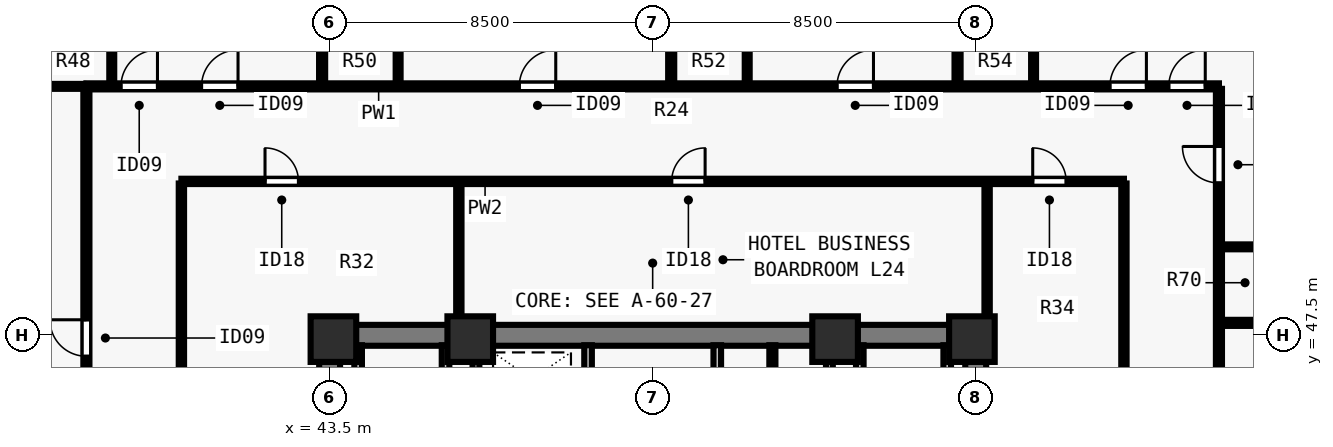
"""IFC4 building model, lengths in metres.
Left out: names, types, materials, properties, quantities, classifications, styles, units other than length and angle.
Written with IfcOpenShell. Run it as: python <this file> out.ifc"""

import sys

from ifc_helpers import new_model, si_unit, direction, frame, frame_2d, origin, origin_2d, place, context, subcontext, project, spatial, rectangle, extrude, element, fill, save


model = new_model("IFC4")
c1 = context("Model", 3, precision=1e-05, world=origin(), true_north=direction((0.0, 1.0)))
c2 = subcontext(c1, "Body", "Model", "MODEL_VIEW")
j1 = project(units=[si_unit("LENGTHUNIT", "METRE"), si_unit("PLANEANGLEUNIT", "RADIAN")], contexts=[c1])
p1 = place(None, origin())
s1 = spatial("IfcSite", under=j1, at=p1, CompositionType="ELEMENT")
p2 = place(p1, origin())
s2 = spatial("IfcBuilding", under=s1, at=p2, CompositionType="ELEMENT")
p3 = place(p2, frame((0.0, 0.0, 90.0)))
s3 = spatial("IfcBuildingStorey", under=s2, at=p3, CompositionType="ELEMENT", Elevation=90.0)
for number, where, z_axis, x_axis in (
    (1, (43.6, 47.4, 0.0), (0.0, 0.0, 1.0), (1.0, 0.0, 0.0)),
    (2, (47.2, 47.4, 0.0), (0.0, 0.0, 1.0), (1.0, 0.0, 0.0)),
    (3, (56.8, 47.4, 0.0), (0.0, 0.0, 1.0), (1.0, 0.0, 0.0)),
    (4, (60.4, 47.4, 0.0), (0.0, 0.0, 1.0), (1.0, 0.0, 0.0)),
):
    element("IfcColumn", number, at=place(p3, frame(where, z_axis=z_axis, x_axis=x_axis)), inside=s3, PredefinedType="COLUMN", context=c2, shape_type="SweptSolid", body=[
        extrude(rectangle(XDim=1.2, YDim=1.2, at=origin_2d()), origin(), (0.0, 0.0, 1.0), 3.5),
    ])
p4 = place(p3, frame((43.225, 47.5, 0.0), z_axis=(0.0, 0.0, 1.0), x_axis=(1.0, 0.0, 0.0)))
e5 = element("IfcWall", 5, at=p4, inside=s3, PredefinedType="SHEAR", context=c2, shape_type="SweptSolid", body=[
    extrude(rectangle(XDim=17.55, YDim=0.55, at=frame_2d((8.775, 0.0))), origin(), (0.0, 0.0, 1.0), 3.28),
])
for number, where, z_axis, x_axis in (
    (6, (43.5, 40.8, 0.0), (0.0, 0.0, 1.0), (0.0, 1.0, 0.0)),
    (7, (60.5, 40.8, 0.0), (0.0, 0.0, 1.0), (0.0, 1.0, 0.0)),
):
    element("IfcWall", number, at=place(p3, frame(where, z_axis=z_axis, x_axis=x_axis)), inside=s3, PredefinedType="SHEAR", context=c2, shape_type="SweptSolid", body=[
        extrude(rectangle(XDim=6.435, YDim=0.55, at=frame_2d((3.218, 0.0))), origin(), (0.0, 0.0, 1.0), 3.28),
    ])
p5 = place(p3, frame((50.3, 40.585, 0.0), z_axis=(0.0, 0.0, 1.0), x_axis=(0.0, 1.0, 0.0)))
e8 = element("IfcWall", 8, at=p5, inside=s3, PredefinedType="SOLIDWALL", context=c2, shape_type="SweptSolid", body=[
    extrude(rectangle(XDim=6.655, YDim=0.2, at=frame_2d((3.328, 0.0))), origin(), (0.0, 0.0, 1.0), 3.28),
])
p6 = place(p5, frame((5.065, 0.0, 0.0)))
e9 = element("IfcOpeningElement", 9, at=p6, cuts=e8, PredefinedType="OPENING", context=c2, shape_type="SweptSolid", body=[
    extrude(rectangle(XDim=0.8, YDim=2.08, at=frame_2d((0.4, 1.04))), frame((0.0, 0.11, 0.0), z_axis=(0.0, -1.0, 0.0), x_axis=(1.0, 0.0, 0.0)), (0.0, 0.0, 1.0), 0.22),
])
p7 = place(p3, frame((53.7, 40.585, 0.0), z_axis=(0.0, 0.0, 1.0), x_axis=(0.0, 1.0, 0.0)))
e10 = element("IfcWall", 10, at=p7, inside=s3, PredefinedType="SOLIDWALL", context=c2, shape_type="SweptSolid", body=[
    extrude(rectangle(XDim=6.655, YDim=0.2, at=frame_2d((3.328, 0.0))), origin(), (0.0, 0.0, 1.0), 3.28),
])
p8 = place(p7, frame((0.195, 0.0, 0.0)))
e11 = element("IfcOpeningElement", 11, at=p8, cuts=e10, PredefinedType="OPENING", context=c2, shape_type="SweptSolid", body=[
    extrude(rectangle(XDim=0.8, YDim=2.08, at=frame_2d((0.4, 1.04))), frame((0.0, 0.11, 0.0), z_axis=(0.0, -1.0, 0.0), x_axis=(1.0, 0.0, 0.0)), (0.0, 0.0, 1.0), 0.22),
])
p9 = place(p7, frame((4.265, 0.0, 0.0)))
e12 = element("IfcOpeningElement", 12, at=p9, cuts=e10, PredefinedType="OPENING", context=c2, shape_type="SweptSolid", body=[
    extrude(rectangle(XDim=0.95, YDim=2.12, at=frame_2d((0.475, 1.06))), frame((0.0, 0.11, 0.0), z_axis=(0.0, -1.0, 0.0), x_axis=(1.0, 0.0, 0.0)), (0.0, 0.0, 1.0), 0.22),
])
for number, where, z_axis, x_axis in (
    (13, (46.55, 43.735, 0.0), (0.0, 0.0, 1.0), (0.0, 1.0, 0.0)),
    (14, (44.25, 43.735, 0.0), (0.0, 0.0, 1.0), (0.0, 1.0, 0.0)),
    (15, (57.45, 43.735, 0.0), (0.0, 0.0, 1.0), (0.0, 1.0, 0.0)),
    (16, (59.75, 43.735, 0.0), (0.0, 0.0, 1.0), (0.0, 1.0, 0.0)),
):
    element("IfcWall", number, at=place(p3, frame(where, z_axis=z_axis, x_axis=x_axis)), inside=s3, PredefinedType="SOLIDWALL", context=c2, shape_type="SweptSolid", body=[
        extrude(rectangle(XDim=3.505, YDim=0.2, at=frame_2d((1.752, 0.0))), origin(), (0.0, 0.0, 1.0), 3.28),
    ])
for number, where, z_axis, x_axis in (
    (17, (47.35, 43.735, 0.0), (0.0, 0.0, 1.0), (0.0, 1.0, 0.0)),
    (18, (56.65, 43.735, 0.0), (0.0, 0.0, 1.0), (0.0, 1.0, 0.0)),
):
    element("IfcWall", number, at=place(p3, frame(where, z_axis=z_axis, x_axis=x_axis)), inside=s3, PredefinedType="SOLIDWALL", context=c2, shape_type="SweptSolid", body=[
        extrude(rectangle(XDim=3.505, YDim=0.18, at=frame_2d((1.752, 0.0))), origin(), (0.0, 0.0, 1.0), 3.28),
    ])
p10 = place(p3, frame((55.15, 44.195, 0.0), z_axis=(0.0, 0.0, 1.0), x_axis=(0.0, 1.0, 0.0)))
e19 = element("IfcWall", 19, at=p10, inside=s3, PredefinedType="PARTITIONING", context=c2, shape_type="SweptSolid", body=[
    extrude(rectangle(XDim=3.045, YDim=0.16, at=frame_2d((1.522, 0.0))), origin(), (0.0, 0.0, 1.0), 3.28),
])
p11 = place(p10, frame((1.025, 0.0, 0.0)))
e20 = element("IfcOpeningElement", 20, at=p11, cuts=e19, PredefinedType="OPENING", context=c2, shape_type="SweptSolid", body=[
    extrude(rectangle(XDim=0.8, YDim=2.1, at=frame_2d((0.4, 1.05))), frame((0.0, 0.09, 0.0), z_axis=(0.0, -1.0, 0.0), x_axis=(1.0, 0.0, 0.0)), (0.0, 0.0, 1.0), 0.18),
])
p12 = place(p3, frame((37.1, 54.05, 0.0), z_axis=(0.0, 0.0, 1.0), x_axis=(1.0, 0.0, 0.0)))
e21 = element("IfcWall", 21, at=p12, inside=s3, PredefinedType="PARTITIONING", context=c2, shape_type="SweptSolid", body=[
    extrude(rectangle(XDim=29.8, YDim=0.16, at=frame_2d((14.9, 0.0))), origin(), (0.0, 0.0, 1.0), 3.28),
])
p13 = place(p12, frame((0.91, 0.0, 0.0)))
e22 = element("IfcOpeningElement", 22, at=p13, cuts=e21, PredefinedType="OPENING", context=c2, shape_type="SweptSolid", body=[
    extrude(rectangle(XDim=0.96, YDim=2.15, at=frame_2d((0.48, 1.075))), frame((0.0, 0.09, 0.0), z_axis=(0.0, -1.0, 0.0), x_axis=(1.0, 0.0, 0.0)), (0.0, 0.0, 1.0), 0.18),
])
p14 = place(p12, frame((3.03, 0.0, 0.0)))
e23 = element("IfcOpeningElement", 23, at=p14, cuts=e21, PredefinedType="OPENING", context=c2, shape_type="SweptSolid", body=[
    extrude(rectangle(XDim=0.96, YDim=2.15, at=frame_2d((0.48, 1.075))), frame((0.0, 0.09, 0.0), z_axis=(0.0, -1.0, 0.0), x_axis=(1.0, 0.0, 0.0)), (0.0, 0.0, 1.0), 0.18),
])
p15 = place(p12, frame((11.39, 0.0, 0.0)))
e24 = element("IfcOpeningElement", 24, at=p15, cuts=e21, PredefinedType="OPENING", context=c2, shape_type="SweptSolid", body=[
    extrude(rectangle(XDim=0.96, YDim=2.15, at=frame_2d((0.48, 1.075))), frame((0.0, 0.09, 0.0), z_axis=(0.0, -1.0, 0.0), x_axis=(1.0, 0.0, 0.0)), (0.0, 0.0, 1.0), 0.18),
])
p16 = place(p12, frame((19.75, 0.0, 0.0)))
e25 = element("IfcOpeningElement", 25, at=p16, cuts=e21, PredefinedType="OPENING", context=c2, shape_type="SweptSolid", body=[
    extrude(rectangle(XDim=0.96, YDim=2.15, at=frame_2d((0.48, 1.075))), frame((0.0, 0.09, 0.0), z_axis=(0.0, -1.0, 0.0), x_axis=(1.0, 0.0, 0.0)), (0.0, 0.0, 1.0), 0.18),
])
p17 = place(p12, frame((26.931, 0.0, 0.0)))
e26 = element("IfcOpeningElement", 26, at=p17, cuts=e21, PredefinedType="OPENING", context=c2, shape_type="SweptSolid", body=[
    extrude(rectangle(XDim=0.96, YDim=2.15, at=frame_2d((0.48, 1.075))), frame((0.0, 0.09, 0.0), z_axis=(0.0, -1.0, 0.0), x_axis=(1.0, 0.0, 0.0)), (0.0, 0.0, 1.0), 0.18),
])
p18 = place(p12, frame((28.48, 0.0, 0.0)))
e27 = element("IfcOpeningElement", 27, at=p18, cuts=e21, PredefinedType="OPENING", context=c2, shape_type="SweptSolid", body=[
    extrude(rectangle(XDim=0.96, YDim=2.15, at=frame_2d((0.48, 1.075))), frame((0.0, 0.09, 0.0), z_axis=(0.0, -1.0, 0.0), x_axis=(1.0, 0.0, 0.0)), (0.0, 0.0, 1.0), 0.18),
])
p19 = place(p3, frame((37.1, 24.015, 0.0), z_axis=(0.0, 0.0, 1.0), x_axis=(0.0, 1.0, 0.0)))
e28 = element("IfcWall", 28, at=p19, inside=s3, PredefinedType="PARTITIONING", context=c2, shape_type="SweptSolid", body=[
    extrude(rectangle(XDim=29.97, YDim=0.16, at=frame_2d((14.985, 0.0))), origin(), (0.0, 0.0, 1.0), 3.28),
])
p20 = place(p19, frame((8.134, 0.0, 0.0)))
e29 = element("IfcOpeningElement", 29, at=p20, cuts=e28, PredefinedType="OPENING", context=c2, shape_type="SweptSolid", body=[
    extrude(rectangle(XDim=0.96, YDim=2.15, at=frame_2d((0.48, 1.075))), frame((0.0, 0.09, 0.0), z_axis=(0.0, -1.0, 0.0), x_axis=(1.0, 0.0, 0.0)), (0.0, 0.0, 1.0), 0.18),
])
p21 = place(p19, frame((22.934, 0.0, 0.0)))
e30 = element("IfcOpeningElement", 30, at=p21, cuts=e28, PredefinedType="OPENING", context=c2, shape_type="SweptSolid", body=[
    extrude(rectangle(XDim=0.96, YDim=2.15, at=frame_2d((0.48, 1.075))), frame((0.0, 0.09, 0.0), z_axis=(0.0, -1.0, 0.0), x_axis=(1.0, 0.0, 0.0)), (0.0, 0.0, 1.0), 0.18),
])
p22 = place(p3, frame((66.9, 24.015, 0.0), z_axis=(0.0, 0.0, 1.0), x_axis=(0.0, 1.0, 0.0)))
e31 = element("IfcWall", 31, at=p22, inside=s3, PredefinedType="PARTITIONING", context=c2, shape_type="SweptSolid", body=[
    extrude(rectangle(XDim=29.97, YDim=0.16, at=frame_2d((14.985, 0.0))), origin(), (0.0, 0.0, 1.0), 3.28),
])
p23 = place(p22, frame((3.911, 0.0, 0.0)))
e32 = element("IfcOpeningElement", 32, at=p23, cuts=e31, PredefinedType="OPENING", context=c2, shape_type="SweptSolid", body=[
    extrude(rectangle(XDim=0.96, YDim=2.15, at=frame_2d((0.48, 1.075))), frame((0.0, 0.09, 0.0), z_axis=(0.0, -1.0, 0.0), x_axis=(1.0, 0.0, 0.0)), (0.0, 0.0, 1.0), 0.18),
])
p24 = place(p22, frame((9.544, 0.0, 0.0)))
e33 = element("IfcOpeningElement", 33, at=p24, cuts=e31, PredefinedType="OPENING", context=c2, shape_type="SweptSolid", body=[
    extrude(rectangle(XDim=0.96, YDim=2.15, at=frame_2d((0.48, 1.075))), frame((0.0, 0.09, 0.0), z_axis=(0.0, -1.0, 0.0), x_axis=(1.0, 0.0, 0.0)), (0.0, 0.0, 1.0), 0.18),
])
p25 = place(p22, frame((15.625, 0.0, 0.0)))
e34 = element("IfcOpeningElement", 34, at=p25, cuts=e31, PredefinedType="OPENING", context=c2, shape_type="SweptSolid", body=[
    extrude(rectangle(XDim=0.96, YDim=2.15, at=frame_2d((0.48, 1.075))), frame((0.0, 0.09, 0.0), z_axis=(0.0, -1.0, 0.0), x_axis=(1.0, 0.0, 0.0)), (0.0, 0.0, 1.0), 0.18),
])
p26 = place(p22, frame((21.584, 0.0, 0.0)))
e35 = element("IfcOpeningElement", 35, at=p26, cuts=e31, PredefinedType="OPENING", context=c2, shape_type="SweptSolid", body=[
    extrude(rectangle(XDim=0.96, YDim=2.15, at=frame_2d((0.48, 1.075))), frame((0.0, 0.09, 0.0), z_axis=(0.0, -1.0, 0.0), x_axis=(1.0, 0.0, 0.0)), (0.0, 0.0, 1.0), 0.18),
])
p27 = place(p22, frame((27.494, 0.0, 0.0)))
e36 = element("IfcOpeningElement", 36, at=p27, cuts=e31, PredefinedType="OPENING", context=c2, shape_type="SweptSolid", body=[
    extrude(rectangle(XDim=0.96, YDim=2.15, at=frame_2d((0.48, 1.075))), frame((0.0, 0.09, 0.0), z_axis=(0.0, -1.0, 0.0), x_axis=(1.0, 0.0, 0.0)), (0.0, 0.0, 1.0), 0.18),
])
p28 = place(p3, frame((39.6, 51.55, 0.0), z_axis=(0.0, 0.0, 1.0), x_axis=(1.0, 0.0, 0.0)))
e37 = element("IfcWall", 37, at=p28, inside=s3, PredefinedType="PARTITIONING", context=c2, shape_type="SweptSolid", body=[
    extrude(rectangle(XDim=24.8, YDim=0.14, at=frame_2d((12.4, 0.0))), origin(), (0.0, 0.0, 1.0), 3.28),
])
p29 = place(p28, frame((2.2, 0.0, 0.0)))
e38 = element("IfcOpeningElement", 38, at=p29, cuts=e37, PredefinedType="OPENING", context=c2, shape_type="SweptSolid", body=[
    extrude(rectangle(XDim=0.88, YDim=2.1, at=frame_2d((0.44, 1.05))), frame((0.0, 0.08, 0.0), z_axis=(0.0, -1.0, 0.0), x_axis=(1.0, 0.0, 0.0)), (0.0, 0.0, 1.0), 0.16),
])
p30 = place(p28, frame((12.9, 0.0, 0.0)))
e39 = element("IfcOpeningElement", 39, at=p30, cuts=e37, PredefinedType="OPENING", context=c2, shape_type="SweptSolid", body=[
    extrude(rectangle(XDim=0.88, YDim=2.1, at=frame_2d((0.44, 1.05))), frame((0.0, 0.08, 0.0), z_axis=(0.0, -1.0, 0.0), x_axis=(1.0, 0.0, 0.0)), (0.0, 0.0, 1.0), 0.16),
])
p31 = place(p28, frame((22.4, 0.0, 0.0)))
e40 = element("IfcOpeningElement", 40, at=p31, cuts=e37, PredefinedType="OPENING", context=c2, shape_type="SweptSolid", body=[
    extrude(rectangle(XDim=0.88, YDim=2.1, at=frame_2d((0.44, 1.05))), frame((0.0, 0.08, 0.0), z_axis=(0.0, -1.0, 0.0), x_axis=(1.0, 0.0, 0.0)), (0.0, 0.0, 1.0), 0.16),
])
p32 = place(p3, frame((39.6, 40.8, 0.0), z_axis=(0.0, 0.0, 1.0), x_axis=(0.0, 1.0, 0.0)))
e41 = element("IfcWall", 41, at=p32, inside=s3, PredefinedType="PARTITIONING", context=c2, shape_type="SweptSolid", body=[
    extrude(rectangle(XDim=10.695, YDim=0.14, at=frame_2d((5.348, 0.0))), origin(), (0.0, 0.0, 1.0), 3.28),
])
p33 = place(p32, frame((2.5, 0.0, 0.0)))
e42 = element("IfcOpeningElement", 42, at=p33, cuts=e41, PredefinedType="OPENING", context=c2, shape_type="SweptSolid", body=[
    extrude(rectangle(XDim=0.88, YDim=2.1, at=frame_2d((0.44, 1.05))), frame((0.0, 0.08, 0.0), z_axis=(0.0, -1.0, 0.0), x_axis=(1.0, 0.0, 0.0)), (0.0, 0.0, 1.0), 0.16),
])
p34 = place(p3, frame((64.4, 40.8, 0.0), z_axis=(0.0, 0.0, 1.0), x_axis=(0.0, 1.0, 0.0)))
e43 = element("IfcWall", 43, at=p34, inside=s3, PredefinedType="PARTITIONING", context=c2, shape_type="SweptSolid", body=[
    extrude(rectangle(XDim=10.695, YDim=0.14, at=frame_2d((5.348, 0.0))), origin(), (0.0, 0.0, 1.0), 3.28),
])
p35 = place(p34, frame((2.5, 0.0, 0.0)))
e44 = element("IfcOpeningElement", 44, at=p35, cuts=e43, PredefinedType="OPENING", context=c2, shape_type="SweptSolid", body=[
    extrude(rectangle(XDim=0.88, YDim=2.1, at=frame_2d((0.44, 1.05))), frame((0.0, 0.08, 0.0), z_axis=(0.0, -1.0, 0.0), x_axis=(1.0, 0.0, 0.0)), (0.0, 0.0, 1.0), 0.16),
])
p36 = place(p3, frame((46.9, 47.76, 0.0), z_axis=(0.0, 0.0, 1.0), x_axis=(0.0, 1.0, 0.0)))
e45 = element("IfcWall", 45, at=p36, inside=s3, PredefinedType="PARTITIONING", context=c2, shape_type="SweptSolid", body=[
    extrude(rectangle(XDim=3.735, YDim=0.14, at=frame_2d((1.868, 0.0))), origin(), (0.0, 0.0, 1.0), 3.28),
])
p37 = place(p3, frame((60.8, 47.76, 0.0), z_axis=(0.0, 0.0, 1.0), x_axis=(0.0, 1.0, 0.0)))
e46 = element("IfcWall", 46, at=p37, inside=s3, PredefinedType="PARTITIONING", context=c2, shape_type="SweptSolid", body=[
    extrude(rectangle(XDim=3.735, YDim=0.14, at=frame_2d((1.868, 0.0))), origin(), (0.0, 0.0, 1.0), 2.439),
])
p38 = place(p3, frame((37.768, 54.115, 0.0), z_axis=(0.0, 0.0, 1.0), x_axis=(0.0, 1.0, 0.0)))
e47 = element("IfcWall", 47, at=p38, inside=s3, PredefinedType="PLUMBINGWALL", context=c2, shape_type="SweptSolid", body=[
    extrude(rectangle(XDim=2.235, YDim=0.13, at=frame_2d((1.118, 0.0))), origin(), (0.0, 0.0, 1.0), 2.439),
])
p39 = place(p3, frame((35.833, 54.05, 0.0), z_axis=(0.0, 0.0, 1.0), x_axis=(1.0, 0.0, 0.0)))
e48 = element("IfcWall", 48, at=p39, inside=s3, PredefinedType="PLUMBINGWALL", context=c2, shape_type="SweptSolid", body=[
    extrude(rectangle(XDim=1.188, YDim=0.13, at=frame_2d((0.594, 0.0))), origin(), (0.0, 0.0, 1.0), 3.28),
])
p40 = place(p3, frame((43.302, 54.115, 0.0), z_axis=(0.0, 0.0, 1.0), x_axis=(0.0, 1.0, 0.0)))
e49 = element("IfcWall", 49, at=p40, inside=s3, PredefinedType="PARTITIONING", context=c2, shape_type="SweptSolid", body=[
    extrude(rectangle(XDim=10.04, YDim=0.16, at=frame_2d((5.02, 0.0))), origin(), (0.0, 0.0, 1.0), 3.28),
])
p41 = place(p3, frame((45.302, 54.115, 0.0), z_axis=(0.0, 0.0, 1.0), x_axis=(0.0, 1.0, 0.0)))
e50 = element("IfcWall", 50, at=p41, inside=s3, PredefinedType="PLUMBINGWALL", context=c2, shape_type="SweptSolid", body=[
    extrude(rectangle(XDim=2.235, YDim=0.13, at=frame_2d((1.118, 0.0))), origin(), (0.0, 0.0, 1.0), 3.28),
])
p42 = place(p3, frame((52.488, 54.115, 0.0), z_axis=(0.0, 0.0, 1.0), x_axis=(0.0, 1.0, 0.0)))
e51 = element("IfcWall", 51, at=p42, inside=s3, PredefinedType="PARTITIONING", context=c2, shape_type="SweptSolid", body=[
    extrude(rectangle(XDim=10.04, YDim=0.16, at=frame_2d((5.02, 0.0))), origin(), (0.0, 0.0, 1.0), 2.849),
])
p43 = place(p3, frame((54.488, 54.115, 0.0), z_axis=(0.0, 0.0, 1.0), x_axis=(0.0, 1.0, 0.0)))
e52 = element("IfcWall", 52, at=p43, inside=s3, PredefinedType="PLUMBINGWALL", context=c2, shape_type="SweptSolid", body=[
    extrude(rectangle(XDim=2.235, YDim=0.13, at=frame_2d((1.118, 0.0))), origin(), (0.0, 0.0, 1.0), 3.28),
])
p44 = place(p3, frame((60.022, 54.115, 0.0), z_axis=(0.0, 0.0, 1.0), x_axis=(0.0, 1.0, 0.0)))
e53 = element("IfcWall", 53, at=p44, inside=s3, PredefinedType="PARTITIONING", context=c2, shape_type="SweptSolid", body=[
    extrude(rectangle(XDim=10.115, YDim=0.16, at=frame_2d((5.058, 0.0))), origin(), (0.0, 0.0, 1.0), 3.28),
])
p45 = place(p3, frame((62.022, 54.115, 0.0), z_axis=(0.0, 0.0, 1.0), x_axis=(0.0, 1.0, 0.0)))
e54 = element("IfcWall", 54, at=p45, inside=s3, PredefinedType="PLUMBINGWALL", context=c2, shape_type="SweptSolid", body=[
    extrude(rectangle(XDim=2.235, YDim=0.13, at=frame_2d((1.118, 0.0))), origin(), (0.0, 0.0, 1.0), 3.28),
])
p46 = place(p3, frame((66.965, 47.827, 0.0), z_axis=(0.0, 0.0, 1.0), x_axis=(1.0, 0.0, 0.0)))
e55 = element("IfcWall", 55, at=p46, inside=s3, PredefinedType="PARTITIONING", context=c2, shape_type="SweptSolid", body=[
    extrude(rectangle(XDim=10.19, YDim=0.16, at=frame_2d((5.095, 0.0))), origin(), (0.0, 0.0, 1.0), 3.28),
])
p47 = place(p3, frame((66.965, 49.827, 0.0), z_axis=(0.0, 0.0, 1.0), x_axis=(1.0, 0.0, 0.0)))
e56 = element("IfcWall", 56, at=p47, inside=s3, PredefinedType="PLUMBINGWALL", context=c2, shape_type="SweptSolid", body=[
    extrude(rectangle(XDim=2.235, YDim=0.13, at=frame_2d((1.117, 0.0))), origin(), (0.0, 0.0, 1.0), 3.28),
])
p48 = place(p29, origin())
e57 = element("IfcDoor", 57, at=p48, inside=s3, OperationType="SINGLE_SWING_LEFT", PredefinedType="DOOR", context=c2, shape_type="SweptSolid", body=[
    extrude(rectangle(XDim=0.88, YDim=2.1, at=frame_2d((0.44, 1.05))), frame((0.0, 0.025, 0.0), z_axis=(0.0, -1.0, 0.0), x_axis=(1.0, 0.0, 0.0)), (0.0, 0.0, 1.0), 0.05),
])
fill(e38, e57)
p49 = place(p30, origin())
e58 = element("IfcDoor", 58, at=p49, inside=s3, OperationType="SINGLE_SWING_RIGHT", PredefinedType="DOOR", context=c2, shape_type="SweptSolid", body=[
    extrude(rectangle(XDim=0.88, YDim=2.1, at=frame_2d((0.44, 1.05))), frame((0.0, 0.025, 0.0), z_axis=(0.0, -1.0, 0.0), x_axis=(1.0, 0.0, 0.0)), (0.0, 0.0, 1.0), 0.05),
])
fill(e39, e58)
p50 = place(p31, origin())
e59 = element("IfcDoor", 59, at=p50, inside=s3, OperationType="SINGLE_SWING_LEFT", PredefinedType="DOOR", context=c2, shape_type="SweptSolid", body=[
    extrude(rectangle(XDim=0.88, YDim=2.1, at=frame_2d((0.44, 1.05))), frame((0.0, 0.025, 0.0), z_axis=(0.0, -1.0, 0.0), x_axis=(1.0, 0.0, 0.0)), (0.0, 0.0, 1.0), 0.05),
])
fill(e40, e59)
p51 = place(p13, origin())
e60 = element("IfcDoor", 60, at=p51, inside=s3, OperationType="SINGLE_SWING_RIGHT", PredefinedType="DOOR", context=c2, shape_type="SweptSolid", body=[
    extrude(rectangle(XDim=0.96, YDim=2.15, at=frame_2d((0.48, 1.075))), frame((0.0, 0.025, 0.0), z_axis=(0.0, -1.0, 0.0), x_axis=(1.0, 0.0, 0.0)), (0.0, 0.0, 1.0), 0.05),
])
fill(e22, e60)
p52 = place(p14, origin())
e61 = element("IfcDoor", 61, at=p52, inside=s3, OperationType="SINGLE_SWING_RIGHT", PredefinedType="DOOR", context=c2, shape_type="SweptSolid", body=[
    extrude(rectangle(XDim=0.96, YDim=2.15, at=frame_2d((0.48, 1.075))), frame((0.0, 0.025, 0.0), z_axis=(0.0, -1.0, 0.0), x_axis=(1.0, 0.0, 0.0)), (0.0, 0.0, 1.0), 0.05),
])
fill(e23, e61)
p53 = place(p15, origin())
e62 = element("IfcDoor", 62, at=p53, inside=s3, OperationType="SINGLE_SWING_RIGHT", PredefinedType="DOOR", context=c2, shape_type="SweptSolid", body=[
    extrude(rectangle(XDim=0.96, YDim=2.15, at=frame_2d((0.48, 1.075))), frame((0.0, 0.025, 0.0), z_axis=(0.0, -1.0, 0.0), x_axis=(1.0, 0.0, 0.0)), (0.0, 0.0, 1.0), 0.05),
])
fill(e24, e62)
p54 = place(p16, origin())
e63 = element("IfcDoor", 63, at=p54, inside=s3, OperationType="SINGLE_SWING_RIGHT", PredefinedType="DOOR", context=c2, shape_type="SweptSolid", body=[
    extrude(rectangle(XDim=0.96, YDim=2.15, at=frame_2d((0.48, 1.075))), frame((0.0, 0.025, 0.0), z_axis=(0.0, -1.0, 0.0), x_axis=(1.0, 0.0, 0.0)), (0.0, 0.0, 1.0), 0.05),
])
fill(e25, e63)
p55 = place(p17, origin())
e64 = element("IfcDoor", 64, at=p55, inside=s3, OperationType="SINGLE_SWING_RIGHT", PredefinedType="DOOR", context=c2, shape_type="SweptSolid", body=[
    extrude(rectangle(XDim=0.96, YDim=2.15, at=frame_2d((0.48, 1.075))), frame((0.0, 0.025, 0.0), z_axis=(0.0, -1.0, 0.0), x_axis=(1.0, 0.0, 0.0)), (0.0, 0.0, 1.0), 0.05),
])
fill(e26, e64)
p56 = place(p18, origin())
e65 = element("IfcDoor", 65, at=p56, inside=s3, OperationType="SINGLE_SWING_RIGHT", PredefinedType="DOOR", context=c2, shape_type="SweptSolid", body=[
    extrude(rectangle(XDim=0.96, YDim=2.15, at=frame_2d((0.48, 1.075))), frame((0.0, 0.025, 0.0), z_axis=(0.0, -1.0, 0.0), x_axis=(1.0, 0.0, 0.0)), (0.0, 0.0, 1.0), 0.05),
])
fill(e27, e65)
p57 = place(p21, origin())
e66 = element("IfcDoor", 66, at=p57, inside=s3, OperationType="SINGLE_SWING_RIGHT", PredefinedType="DOOR", context=c2, shape_type="SweptSolid", body=[
    extrude(rectangle(XDim=0.96, YDim=2.15, at=frame_2d((0.48, 1.075))), frame((0.0, 0.025, 0.0), z_axis=(0.0, -1.0, 0.0), x_axis=(1.0, 0.0, 0.0)), (0.0, 0.0, 1.0), 0.05),
])
fill(e30, e66)
p58 = place(p27, origin())
e67 = element("IfcDoor", 67, at=p58, inside=s3, OperationType="SINGLE_SWING_RIGHT", PredefinedType="DOOR", context=c2, shape_type="SweptSolid", body=[
    extrude(rectangle(XDim=0.96, YDim=2.15, at=frame_2d((0.48, 1.075))), frame((0.0, 0.025, 0.0), z_axis=(0.0, -1.0, 0.0), x_axis=(1.0, 0.0, 0.0)), (0.0, 0.0, 1.0), 0.05),
])
fill(e36, e67)
save(model, sys.argv[1])
